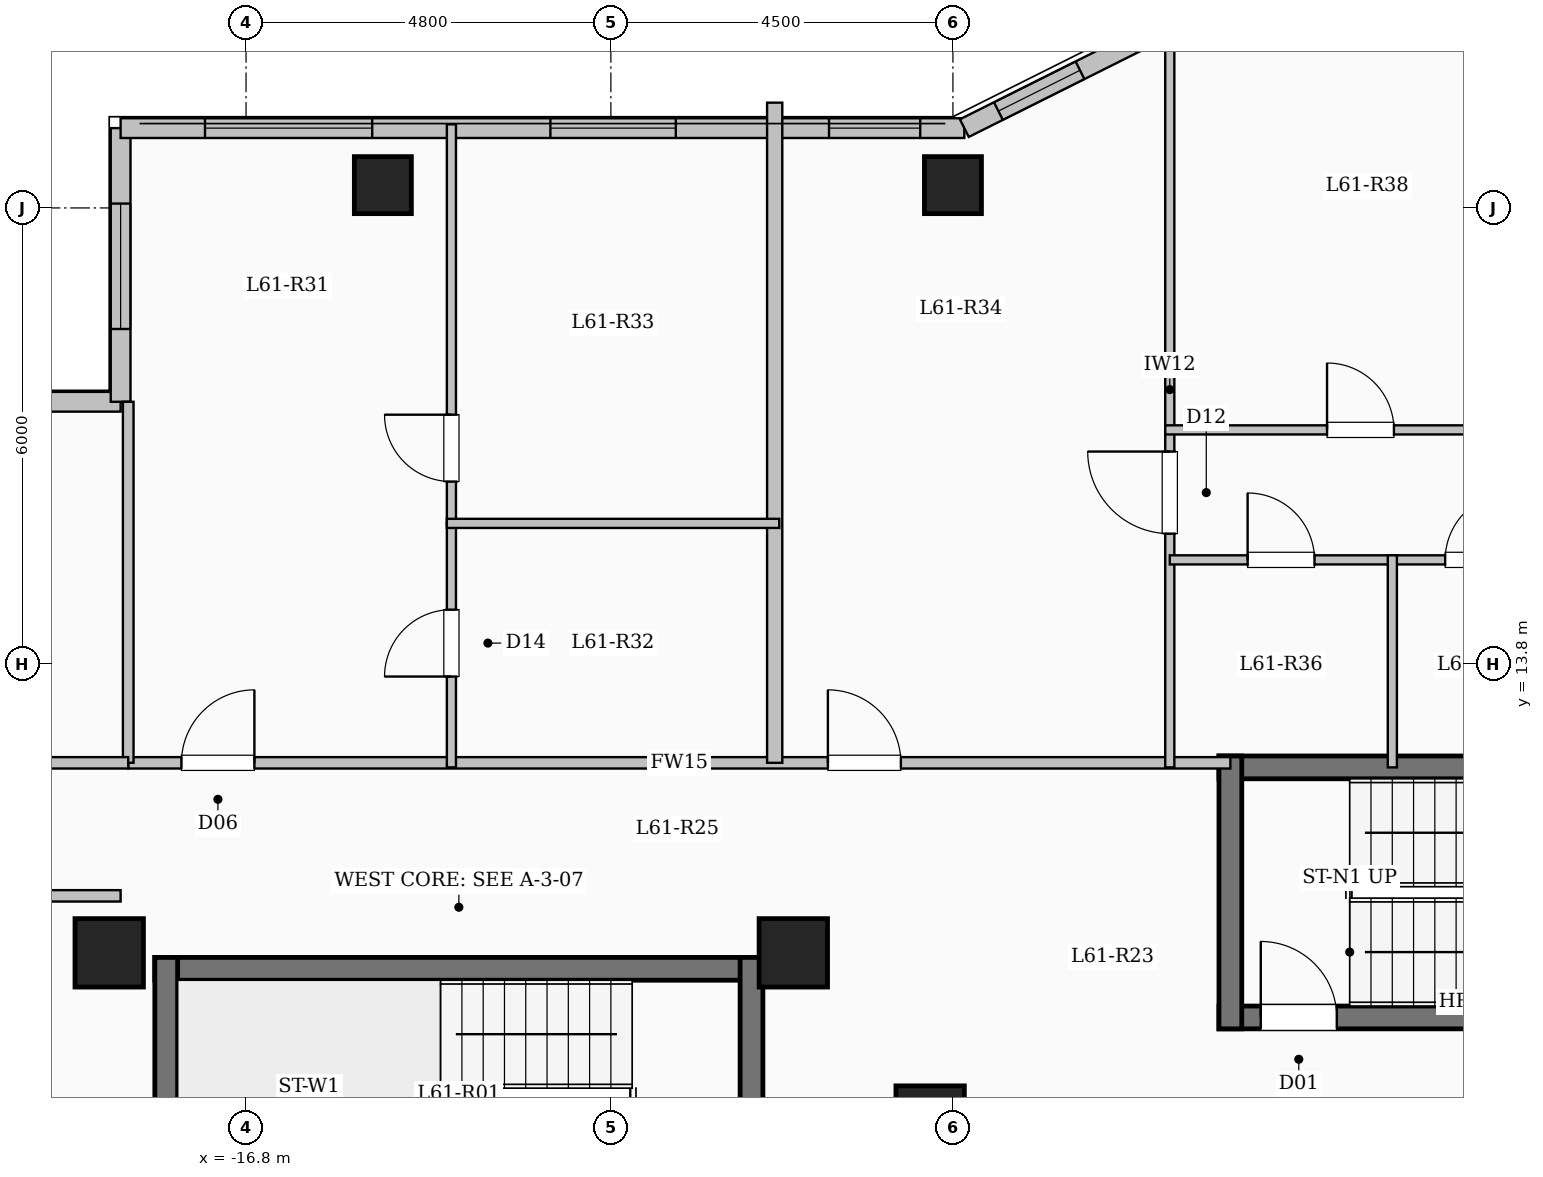
"""IFC4 building model, lengths in metres.
Left out: names, types, materials, properties, quantities, classifications, styles, units other than length and angle.
Written with IfcOpenShell. Run it as: python <this file> out.ifc"""

import sys

from ifc_helpers import new_model, si_unit, direction, frame, frame_2d, origin, origin_2d, place, context, subcontext, project, spatial, rectangle, extrude, element, fill, save


model = new_model("IFC4")
c1 = context("Model", 3, precision=1e-05, world=origin(), true_north=direction((0.0, 1.0)))
c2 = subcontext(c1, "Body", "Model", "MODEL_VIEW")
j1 = project(units=[si_unit("LENGTHUNIT", "METRE"), si_unit("PLANEANGLEUNIT", "RADIAN")], contexts=[c1])
p1 = place(None, origin())
s1 = spatial("IfcSite", under=j1, at=p1, CompositionType="ELEMENT")
p2 = place(p1, origin())
s2 = spatial("IfcBuilding", under=s1, at=p2, CompositionType="ELEMENT")
p3 = place(p2, frame((0.0, 0.0, 223.75)))
s3 = spatial("IfcBuildingStorey", under=s2, at=p3, CompositionType="ELEMENT", Elevation=223.75)
for number, where, z_axis, x_axis in (
    (1, (-7.8, 7.8, 0.0), (0.0, 0.0, 1.0), (1.0, 0.0, 0.0)),
    (2, (-9.6, 10.0, 0.0), (0.0, 0.0, 1.0), (1.0, 0.0, 0.0)),
    (3, (-18.6, 10.0, 0.0), (0.0, 0.0, 1.0), (1.0, 0.0, 0.0)),
):
    element("IfcColumn", number, at=place(p3, frame(where, z_axis=z_axis, x_axis=x_axis)), inside=s3, PredefinedType="COLUMN", context=c2, shape_type="SweptSolid", body=[
        extrude(rectangle(XDim=0.9, YDim=0.9, at=origin_2d()), origin(), (0.0, 0.0, 1.0), 3.35),
    ])
for number, where, z_axis, x_axis in (
    (4, (-15.0, 20.1, 0.0), (0.0, 0.0, 1.0), (1.0, 0.0, 0.0)),
    (5, (-7.5, 20.1, 0.0), (0.0, 0.0, 1.0), (1.0, 0.0, 0.0)),
):
    element("IfcColumn", number, at=place(p3, frame(where, z_axis=z_axis, x_axis=x_axis)), inside=s3, PredefinedType="COLUMN", context=c2, shape_type="SweptSolid", body=[
        extrude(rectangle(XDim=0.75, YDim=0.75, at=origin_2d()), origin(), (0.0, 0.0, 1.0), 3.35),
    ])
p4 = place(p3, frame((-23.55, 17.25, 0.0), z_axis=(0.0, 0.0, 1.0), x_axis=(1.0, 0.0, 0.0)))
e6 = element("IfcWall", 6, at=p4, inside=s3, PredefinedType="SOLIDWALL", context=c2, shape_type="SweptSolid", body=[
    extrude(rectangle(XDim=5.1, YDim=0.26, at=frame_2d((2.55, 0.0))), origin(), (0.0, 0.0, 1.0), 3.05),
])
p5 = place(p4, frame((1.575, 0.0, 0.9)))
e7 = element("IfcOpeningElement", 7, at=p5, cuts=e6, PredefinedType="OPENING", context=c2, shape_type="SweptSolid", body=[
    extrude(rectangle(XDim=2.0, YDim=1.7, at=frame_2d((1.0, 0.85))), frame((0.0, 0.14, 0.0), z_axis=(0.0, -1.0, 0.0), x_axis=(1.0, 0.0, 0.0)), (0.0, 0.0, 1.0), 0.28),
])
p6 = place(p3, frame((-18.45, 17.25, 0.0), z_axis=(0.0, 0.0, 1.0), x_axis=(0.0, 1.0, 0.0)))
e8 = element("IfcWall", 8, at=p6, inside=s3, PredefinedType="SOLIDWALL", context=c2, shape_type="SweptSolid", body=[
    extrude(rectangle(XDim=3.6, YDim=0.26, at=frame_2d((1.8, 0.0))), origin(), (0.0, 0.0, 1.0), 3.05),
])
p7 = place(p6, frame((0.958, 0.0, 0.9)))
e9 = element("IfcOpeningElement", 9, at=p7, cuts=e8, PredefinedType="OPENING", context=c2, shape_type="SweptSolid", body=[
    extrude(rectangle(XDim=1.65, YDim=1.6, at=frame_2d((0.825, 0.8))), frame((0.0, 0.14, 0.0), z_axis=(0.0, -1.0, 0.0), x_axis=(1.0, 0.0, 0.0)), (0.0, 0.0, 1.0), 0.28),
])
p8 = place(p3, frame((-18.45, 20.85, 0.0), z_axis=(0.0, 0.0, 1.0), x_axis=(1.0, 0.0, 0.0)))
e10 = element("IfcWall", 10, at=p8, inside=s3, PredefinedType="SOLIDWALL", context=c2, shape_type="SweptSolid", body=[
    extrude(rectangle(XDim=11.1, YDim=0.26, at=frame_2d((5.55, 0.0))), origin(), (0.0, 0.0, 1.0), 3.05),
])
p9 = place(p8, frame((1.11, 0.0, 0.9)))
e11 = element("IfcOpeningElement", 11, at=p9, cuts=e10, PredefinedType="OPENING", context=c2, shape_type="SweptSolid", body=[
    extrude(rectangle(XDim=2.2, YDim=1.75, at=frame_2d((1.1, 0.875))), frame((0.0, 0.14, 0.0), z_axis=(0.0, -1.0, 0.0), x_axis=(1.0, 0.0, 0.0)), (0.0, 0.0, 1.0), 0.28),
])
p10 = place(p8, frame((5.654, 0.0, 0.9)))
e12 = element("IfcOpeningElement", 12, at=p10, cuts=e10, PredefinedType="OPENING", context=c2, shape_type="SweptSolid", body=[
    extrude(rectangle(XDim=1.65, YDim=1.6, at=frame_2d((0.825, 0.8))), frame((0.0, 0.14, 0.0), z_axis=(0.0, -1.0, 0.0), x_axis=(1.0, 0.0, 0.0)), (0.0, 0.0, 1.0), 0.28),
])
p11 = place(p8, frame((9.32, 0.0, 0.95)))
e13 = element("IfcOpeningElement", 13, at=p11, cuts=e10, PredefinedType="OPENING", context=c2, shape_type="SweptSolid", body=[
    extrude(rectangle(XDim=1.2, YDim=1.5, at=frame_2d((0.6, 0.75))), frame((0.0, 0.14, 0.0), z_axis=(0.0, -1.0, 0.0), x_axis=(1.0, 0.0, 0.0)), (0.0, 0.0, 1.0), 0.28),
])
p12 = place(p3, frame((-7.35, 20.85, 0.0), z_axis=(0.0, 0.0, 1.0), x_axis=(0.894427191, 0.4472135955, 0.0)))
e14 = element("IfcWall", 14, at=p12, inside=s3, PredefinedType="SOLIDWALL", context=c2, shape_type="SweptSolid", body=[
    extrude(rectangle(XDim=3.354, YDim=0.26, at=frame_2d((1.677, 0.0))), origin(), (0.0, 0.0, 1.0), 3.05),
])
p13 = place(p12, frame((0.501, 0.0, 0.95)))
e15 = element("IfcOpeningElement", 15, at=p13, cuts=e14, PredefinedType="OPENING", context=c2, shape_type="SweptSolid", body=[
    extrude(rectangle(XDim=1.2, YDim=1.5, at=frame_2d((0.6, 0.75))), frame((0.0, 0.14, 0.0), z_axis=(0.0, -1.0, 0.0), x_axis=(1.0, 0.0, 0.0)), (0.0, 0.0, 1.0), 0.28),
])
p14 = place(p3, frame((-18.0, 9.79, 0.0), z_axis=(0.0, 0.0, 1.0), x_axis=(1.0, 0.0, 0.0)))
e16 = element("IfcWall", 16, at=p14, inside=s3, PredefinedType="SHEAR", context=c2, shape_type="SweptSolid", body=[
    extrude(rectangle(XDim=8.0, YDim=0.3, at=frame_2d((4.0, 0.0))), origin(), (0.0, 0.0, 1.0), 3.35),
])
for number, where, z_axis, x_axis in (
    (17, (-17.85, 6.35, 0.0), (0.0, 0.0, 1.0), (0.0, 1.0, 0.0)),
    (18, (-10.15, 6.35, 0.0), (0.0, 0.0, 1.0), (0.0, 1.0, 0.0)),
):
    element("IfcWall", number, at=place(p3, frame(where, z_axis=z_axis, x_axis=x_axis)), inside=s3, PredefinedType="SHEAR", context=c2, shape_type="SweptSolid", body=[
        extrude(rectangle(XDim=3.59, YDim=0.3, at=frame_2d((1.795, 0.0))), origin(), (0.0, 0.0, 1.0), 3.35),
    ])
p15 = place(p3, frame((-4.0, 12.44, 0.0), z_axis=(0.0, 0.0, 1.0), x_axis=(1.0, 0.0, 0.0)))
e19 = element("IfcWall", 19, at=p15, inside=s3, PredefinedType="SHEAR", context=c2, shape_type="SweptSolid", body=[
    extrude(rectangle(XDim=8.0, YDim=0.3, at=frame_2d((4.0, 0.0))), origin(), (0.0, 0.0, 1.0), 3.35),
])
p16 = place(p3, frame((-4.0, 9.15, 0.0), z_axis=(0.0, 0.0, 1.0), x_axis=(1.0, 0.0, 0.0)))
e20 = element("IfcWall", 20, at=p16, inside=s3, PredefinedType="SHEAR", context=c2, shape_type="SweptSolid", body=[
    extrude(rectangle(XDim=8.0, YDim=0.3, at=frame_2d((4.0, 0.0))), origin(), (0.0, 0.0, 1.0), 3.35),
])
p17 = place(p16, frame((0.55, 0.0, 0.0)))
e21 = element("IfcOpeningElement", 21, at=p17, cuts=e20, PredefinedType="OPENING", context=c2, shape_type="SweptSolid", body=[
    extrude(rectangle(XDim=1.0, YDim=2.15, at=frame_2d((0.5, 1.075))), frame((0.0, 0.16, 0.0), z_axis=(0.0, -1.0, 0.0), x_axis=(1.0, 0.0, 0.0)), (0.0, 0.0, 1.0), 0.32),
])
p18 = place(p3, frame((-3.85, 9.0, 0.0), z_axis=(0.0, 0.0, 1.0), x_axis=(0.0, 1.0, 0.0)))
e22 = element("IfcWall", 22, at=p18, inside=s3, PredefinedType="SHEAR", context=c2, shape_type="SweptSolid", body=[
    extrude(rectangle(XDim=3.59, YDim=0.3, at=frame_2d((1.795, 0.0))), origin(), (0.0, 0.0, 1.0), 3.35),
])
p19 = place(p3, frame((-18.35, 12.5, 0.0), z_axis=(0.0, 0.0, 1.0), x_axis=(1.0, 0.0, 0.0)))
e23 = element("IfcWall", 23, at=p19, inside=s3, PredefinedType="PARTITIONING", context=c2, shape_type="SweptSolid", body=[
    extrude(rectangle(XDim=14.5, YDim=0.15, at=frame_2d((7.25, 0.0))), origin(), (0.0, 0.0, 1.0), 3.05),
])
p20 = place(p19, frame((0.7, 0.0, 0.0)))
e24 = element("IfcOpeningElement", 24, at=p20, cuts=e23, PredefinedType="OPENING", context=c2, shape_type="SweptSolid", body=[
    extrude(rectangle(XDim=0.96, YDim=2.15, at=frame_2d((0.48, 1.075))), frame((0.0, 0.085, 0.0), z_axis=(0.0, -1.0, 0.0), x_axis=(1.0, 0.0, 0.0)), (0.0, 0.0, 1.0), 0.17),
])
p21 = place(p19, frame((9.205, 0.0, 0.0)))
e25 = element("IfcOpeningElement", 25, at=p21, cuts=e23, PredefinedType="OPENING", context=c2, shape_type="SweptSolid", body=[
    extrude(rectangle(XDim=0.96, YDim=2.15, at=frame_2d((0.48, 1.075))), frame((0.0, 0.085, 0.0), z_axis=(0.0, -1.0, 0.0), x_axis=(1.0, 0.0, 0.0)), (0.0, 0.0, 1.0), 0.17),
])
p22 = place(p3, frame((-9.845, 12.5, 0.0), z_axis=(0.0, 0.0, 1.0), x_axis=(0.0, 1.0, 0.0)))
e26 = element("IfcWall", 26, at=p22, inside=s3, PredefinedType="SOLIDWALL", context=c2, shape_type="SweptSolid", body=[
    extrude(rectangle(XDim=8.685, YDim=0.2, at=frame_2d((4.343, 0.0))), origin(), (0.0, 0.0, 1.0), 3.05),
])
p23 = place(p3, frame((-14.098, 12.44, 0.0), z_axis=(0.0, 0.0, 1.0), x_axis=(0.0, 1.0, 0.0)))
e27 = element("IfcWall", 27, at=p23, inside=s3, PredefinedType="PARTITIONING", context=c2, shape_type="SweptSolid", body=[
    extrude(rectangle(XDim=3.21, YDim=0.12, at=frame_2d((1.605, 0.0))), origin(), (0.0, 0.0, 1.0), 3.05),
])
p24 = place(p23, frame((1.195, 0.0, 0.0)))
e28 = element("IfcOpeningElement", 28, at=p24, cuts=e27, PredefinedType="OPENING", context=c2, shape_type="SweptSolid", body=[
    extrude(rectangle(XDim=0.88, YDim=2.1, at=frame_2d((0.44, 1.05))), frame((0.0, 0.07, 0.0), z_axis=(0.0, -1.0, 0.0), x_axis=(1.0, 0.0, 0.0)), (0.0, 0.0, 1.0), 0.14),
])
p25 = place(p3, frame((-14.098, 15.65, 0.0), z_axis=(0.0, 0.0, 1.0), x_axis=(0.0, 1.0, 0.0)))
e29 = element("IfcWall", 29, at=p25, inside=s3, PredefinedType="PARTITIONING", context=c2, shape_type="SweptSolid", body=[
    extrude(rectangle(XDim=5.25, YDim=0.12, at=frame_2d((2.625, 0.0))), origin(), (0.0, 0.0, 1.0), 3.05),
])
p26 = place(p25, frame((0.55, 0.0, 0.0)))
e30 = element("IfcOpeningElement", 30, at=p26, cuts=e29, PredefinedType="OPENING", context=c2, shape_type="SweptSolid", body=[
    extrude(rectangle(XDim=0.88, YDim=2.1, at=frame_2d((0.44, 1.05))), frame((0.0, 0.07, 0.0), z_axis=(0.0, -1.0, 0.0), x_axis=(1.0, 0.0, 0.0)), (0.0, 0.0, 1.0), 0.14),
])
p27 = place(p3, frame((-14.158, 15.65, 0.0), z_axis=(0.0, 0.0, 1.0), x_axis=(1.0, 0.0, 0.0)))
e31 = element("IfcWall", 31, at=p27, inside=s3, PredefinedType="PARTITIONING", context=c2, shape_type="SweptSolid", body=[
    extrude(rectangle(XDim=4.373, YDim=0.12, at=frame_2d((2.187, 0.0))), origin(), (0.0, 0.0, 1.0), 2.675),
])
p28 = place(p3, frame((-4.647, 12.44, 0.0), z_axis=(0.0, 0.0, 1.0), x_axis=(0.0, 1.0, 0.0)))
e32 = element("IfcWall", 32, at=p28, inside=s3, PredefinedType="PARTITIONING", context=c2, shape_type="SweptSolid", body=[
    extrude(rectangle(XDim=9.94, YDim=0.12, at=frame_2d((4.97, 0.0))), origin(), (0.0, 0.0, 1.0), 3.05),
])
p29 = place(p28, frame((3.075, 0.0, 0.0)))
e33 = element("IfcOpeningElement", 33, at=p29, cuts=e32, PredefinedType="OPENING", context=c2, shape_type="SweptSolid", body=[
    extrude(rectangle(XDim=1.08, YDim=2.15, at=frame_2d((0.54, 1.075))), frame((0.0, 0.07, 0.0), z_axis=(0.0, -1.0, 0.0), x_axis=(1.0, 0.0, 0.0)), (0.0, 0.0, 1.0), 0.14),
])
p30 = place(p3, frame((-4.647, 15.17, 0.0), z_axis=(0.0, 0.0, 1.0), x_axis=(1.0, 0.0, 0.0)))
e34 = element("IfcWall", 34, at=p30, inside=s3, PredefinedType="PARTITIONING", context=c2, shape_type="SweptSolid", body=[
    extrude(rectangle(XDim=2.928, YDim=0.12, at=frame_2d((1.464, 0.0))), origin(), (0.0, 0.0, 1.0), 3.05),
])
p31 = place(p30, frame((1.024, 0.0, 0.0)))
e35 = element("IfcOpeningElement", 35, at=p31, cuts=e34, PredefinedType="OPENING", context=c2, shape_type="SweptSolid", body=[
    extrude(rectangle(XDim=0.88, YDim=2.1, at=frame_2d((0.44, 1.05))), frame((0.0, 0.07, 0.0), z_axis=(0.0, -1.0, 0.0), x_axis=(1.0, 0.0, 0.0)), (0.0, 0.0, 1.0), 0.14),
])
p32 = place(p3, frame((-1.719, 15.17, 0.0), z_axis=(0.0, 0.0, 1.0), x_axis=(1.0, 0.0, 0.0)))
e36 = element("IfcWall", 36, at=p32, inside=s3, PredefinedType="PARTITIONING", context=c2, shape_type="SweptSolid", body=[
    extrude(rectangle(XDim=2.269, YDim=0.12, at=frame_2d((1.135, 0.0))), origin(), (0.0, 0.0, 1.0), 3.05),
])
p33 = place(p32, frame((0.695, 0.0, 0.0)))
e37 = element("IfcOpeningElement", 37, at=p33, cuts=e36, PredefinedType="OPENING", context=c2, shape_type="SweptSolid", body=[
    extrude(rectangle(XDim=0.88, YDim=2.1, at=frame_2d((0.44, 1.05))), frame((0.0, 0.07, 0.0), z_axis=(0.0, -1.0, 0.0), x_axis=(1.0, 0.0, 0.0)), (0.0, 0.0, 1.0), 0.14),
])
p34 = place(p3, frame((-4.707, 16.88, 0.0), z_axis=(0.0, 0.0, 1.0), x_axis=(1.0, 0.0, 0.0)))
e38 = element("IfcWall", 38, at=p34, inside=s3, PredefinedType="PARTITIONING", context=c2, shape_type="SweptSolid", body=[
    extrude(rectangle(XDim=5.317, YDim=0.12, at=frame_2d((2.659, 0.0))), origin(), (0.0, 0.0, 1.0), 2.675),
])
p35 = place(p34, frame((2.129, 0.0, 0.0)))
e39 = element("IfcOpeningElement", 39, at=p35, cuts=e38, PredefinedType="OPENING", context=c2, shape_type="SweptSolid", body=[
    extrude(rectangle(XDim=0.88, YDim=2.1, at=frame_2d((0.44, 1.05))), frame((0.0, 0.07, 0.0), z_axis=(0.0, -1.0, 0.0), x_axis=(1.0, 0.0, 0.0)), (0.0, 0.0, 1.0), 0.14),
])
p36 = place(p3, frame((-1.719, 12.44, 0.0), z_axis=(0.0, 0.0, 1.0), x_axis=(0.0, 1.0, 0.0)))
e40 = element("IfcWall", 40, at=p36, inside=s3, PredefinedType="PARTITIONING", context=c2, shape_type="SweptSolid", body=[
    extrude(rectangle(XDim=2.79, YDim=0.12, at=frame_2d((1.395, 0.0))), origin(), (0.0, 0.0, 1.0), 3.05),
])
p37 = place(p3, frame((-23.58, 10.75, 0.0), z_axis=(0.0, 0.0, 1.0), x_axis=(1.0, 0.0, 0.0)))
e41 = element("IfcWall", 41, at=p37, inside=s3, PredefinedType="PARTITIONING", context=c2, shape_type="SweptSolid", body=[
    extrude(rectangle(XDim=5.13, YDim=0.15, at=frame_2d((2.565, 0.0))), origin(), (0.0, 0.0, 1.0), 3.05),
])
p38 = place(p3, frame((-18.35, 12.5, 0.0), z_axis=(0.0, 0.0, 1.0), x_axis=(0.0, 1.0, 0.0)))
e42 = element("IfcWall", 42, at=p38, inside=s3, PredefinedType="PARTITIONING", context=c2, shape_type="SweptSolid", body=[
    extrude(rectangle(XDim=4.75, YDim=0.14, at=frame_2d((2.375, 0.0))), origin(), (0.0, 0.0, 1.0), 3.05),
])
p39 = place(p3, frame((-23.58, 12.5, 0.0), z_axis=(0.0, 0.0, 1.0), x_axis=(1.0, 0.0, 0.0)))
e43 = element("IfcWall", 43, at=p39, inside=s3, PredefinedType="PARTITIONING", context=c2, shape_type="SweptSolid", body=[
    extrude(rectangle(XDim=5.23, YDim=0.15, at=frame_2d((2.615, 0.0))), origin(), (0.0, 0.0, 1.0), 3.05),
])
p40 = place(p39, frame((2.14, 0.0, 0.0)))
e44 = element("IfcOpeningElement", 44, at=p40, cuts=e43, PredefinedType="OPENING", context=c2, shape_type="SweptSolid", body=[
    extrude(rectangle(XDim=0.95, YDim=2.15, at=frame_2d((0.475, 1.075))), frame((0.0, 0.085, 0.0), z_axis=(0.0, -1.0, 0.0), x_axis=(1.0, 0.0, 0.0)), (0.0, 0.0, 1.0), 0.17),
])
p41 = place(p7, origin())
e45 = element("IfcWindow", 45, at=p41, inside=s3, PartitioningType="SINGLE_PANEL", PredefinedType="WINDOW", context=c2, shape_type="SweptSolid", body=[
    extrude(rectangle(XDim=1.65, YDim=1.6, at=frame_2d((0.825, 0.8))), frame((0.0, 0.03, 0.0), z_axis=(0.0, -1.0, 0.0), x_axis=(1.0, 0.0, 0.0)), (0.0, 0.0, 1.0), 0.06),
])
fill(e9, e45)
p42 = place(p9, origin())
e46 = element("IfcWindow", 46, at=p42, inside=s3, PartitioningType="SINGLE_PANEL", PredefinedType="WINDOW", context=c2, shape_type="SweptSolid", body=[
    extrude(rectangle(XDim=2.2, YDim=1.75, at=frame_2d((1.1, 0.875))), frame((0.0, 0.03, 0.0), z_axis=(0.0, -1.0, 0.0), x_axis=(1.0, 0.0, 0.0)), (0.0, 0.0, 1.0), 0.06),
])
fill(e11, e46)
p43 = place(p10, origin())
e47 = element("IfcWindow", 47, at=p43, inside=s3, PartitioningType="SINGLE_PANEL", PredefinedType="WINDOW", context=c2, shape_type="SweptSolid", body=[
    extrude(rectangle(XDim=1.65, YDim=1.6, at=frame_2d((0.825, 0.8))), frame((0.0, 0.03, 0.0), z_axis=(0.0, -1.0, 0.0), x_axis=(1.0, 0.0, 0.0)), (0.0, 0.0, 1.0), 0.06),
])
fill(e12, e47)
p44 = place(p11, origin())
e48 = element("IfcWindow", 48, at=p44, inside=s3, PartitioningType="SINGLE_PANEL", PredefinedType="WINDOW", context=c2, shape_type="SweptSolid", body=[
    extrude(rectangle(XDim=1.2, YDim=1.5, at=frame_2d((0.6, 0.75))), frame((0.0, 0.03, 0.0), z_axis=(0.0, -1.0, 0.0), x_axis=(1.0, 0.0, 0.0)), (0.0, 0.0, 1.0), 0.06),
])
fill(e13, e48)
p45 = place(p13, origin())
e49 = element("IfcWindow", 49, at=p45, inside=s3, PartitioningType="SINGLE_PANEL", PredefinedType="WINDOW", context=c2, shape_type="SweptSolid", body=[
    extrude(rectangle(XDim=1.2, YDim=1.5, at=frame_2d((0.6, 0.75))), frame((0.0, 0.03, 0.0), z_axis=(0.0, -1.0, 0.0), x_axis=(1.0, 0.0, 0.0)), (0.0, 0.0, 1.0), 0.06),
])
fill(e15, e49)
p46 = place(p17, origin())
e50 = element("IfcDoor", 50, at=p46, inside=s3, OperationType="SINGLE_SWING_LEFT", PredefinedType="DOOR", context=c2, shape_type="SweptSolid", body=[
    extrude(rectangle(XDim=1.0, YDim=2.15, at=frame_2d((0.5, 1.075))), frame((0.0, 0.025, 0.0), z_axis=(0.0, -1.0, 0.0), x_axis=(1.0, 0.0, 0.0)), (0.0, 0.0, 1.0), 0.05),
])
fill(e21, e50)
p47 = place(p20, origin())
e51 = element("IfcDoor", 51, at=p47, inside=s3, OperationType="SINGLE_SWING_RIGHT", PredefinedType="DOOR", context=c2, shape_type="SweptSolid", body=[
    extrude(rectangle(XDim=0.96, YDim=2.15, at=frame_2d((0.48, 1.075))), frame((0.0, 0.025, 0.0), z_axis=(0.0, -1.0, 0.0), x_axis=(1.0, 0.0, 0.0)), (0.0, 0.0, 1.0), 0.05),
])
fill(e24, e51)
p48 = place(p24, origin())
e52 = element("IfcDoor", 52, at=p48, inside=s3, OperationType="SINGLE_SWING_LEFT", PredefinedType="DOOR", context=c2, shape_type="SweptSolid", body=[
    extrude(rectangle(XDim=0.88, YDim=2.1, at=frame_2d((0.44, 1.05))), frame((0.0, 0.025, 0.0), z_axis=(0.0, -1.0, 0.0), x_axis=(1.0, 0.0, 0.0)), (0.0, 0.0, 1.0), 0.05),
])
fill(e28, e52)
p49 = place(p26, origin())
e53 = element("IfcDoor", 53, at=p49, inside=s3, OperationType="SINGLE_SWING_RIGHT", PredefinedType="DOOR", context=c2, shape_type="SweptSolid", body=[
    extrude(rectangle(XDim=0.88, YDim=2.1, at=frame_2d((0.44, 1.05))), frame((0.0, 0.025, 0.0), z_axis=(0.0, -1.0, 0.0), x_axis=(1.0, 0.0, 0.0)), (0.0, 0.0, 1.0), 0.05),
])
fill(e30, e53)
p50 = place(p21, origin())
e54 = element("IfcDoor", 54, at=p50, inside=s3, OperationType="SINGLE_SWING_LEFT", PredefinedType="DOOR", context=c2, shape_type="SweptSolid", body=[
    extrude(rectangle(XDim=0.96, YDim=2.15, at=frame_2d((0.48, 1.075))), frame((0.0, 0.025, 0.0), z_axis=(0.0, -1.0, 0.0), x_axis=(1.0, 0.0, 0.0)), (0.0, 0.0, 1.0), 0.05),
])
fill(e25, e54)
p51 = place(p29, origin())
e55 = element("IfcDoor", 55, at=p51, inside=s3, OperationType="SINGLE_SWING_RIGHT", PredefinedType="DOOR", context=c2, shape_type="SweptSolid", body=[
    extrude(rectangle(XDim=1.08, YDim=2.15, at=frame_2d((0.54, 1.075))), frame((0.0, 0.025, 0.0), z_axis=(0.0, -1.0, 0.0), x_axis=(1.0, 0.0, 0.0)), (0.0, 0.0, 1.0), 0.05),
])
fill(e33, e55)
p52 = place(p31, origin())
e56 = element("IfcDoor", 56, at=p52, inside=s3, OperationType="SINGLE_SWING_LEFT", PredefinedType="DOOR", context=c2, shape_type="SweptSolid", body=[
    extrude(rectangle(XDim=0.88, YDim=2.1, at=frame_2d((0.44, 1.05))), frame((0.0, 0.025, 0.0), z_axis=(0.0, -1.0, 0.0), x_axis=(1.0, 0.0, 0.0)), (0.0, 0.0, 1.0), 0.05),
])
fill(e35, e56)
p53 = place(p33, origin())
e57 = element("IfcDoor", 57, at=p53, inside=s3, OperationType="SINGLE_SWING_RIGHT", PredefinedType="DOOR", context=c2, shape_type="SweptSolid", body=[
    extrude(rectangle(XDim=0.88, YDim=2.1, at=frame_2d((0.44, 1.05))), frame((0.0, 0.025, 0.0), z_axis=(0.0, -1.0, 0.0), x_axis=(1.0, 0.0, 0.0)), (0.0, 0.0, 1.0), 0.05),
])
fill(e37, e57)
p54 = place(p35, origin())
e58 = element("IfcDoor", 58, at=p54, inside=s3, OperationType="SINGLE_SWING_LEFT", PredefinedType="DOOR", context=c2, shape_type="SweptSolid", body=[
    extrude(rectangle(XDim=0.88, YDim=2.1, at=frame_2d((0.44, 1.05))), frame((0.0, 0.025, 0.0), z_axis=(0.0, -1.0, 0.0), x_axis=(1.0, 0.0, 0.0)), (0.0, 0.0, 1.0), 0.05),
])
fill(e39, e58)
save(model, sys.argv[1])
